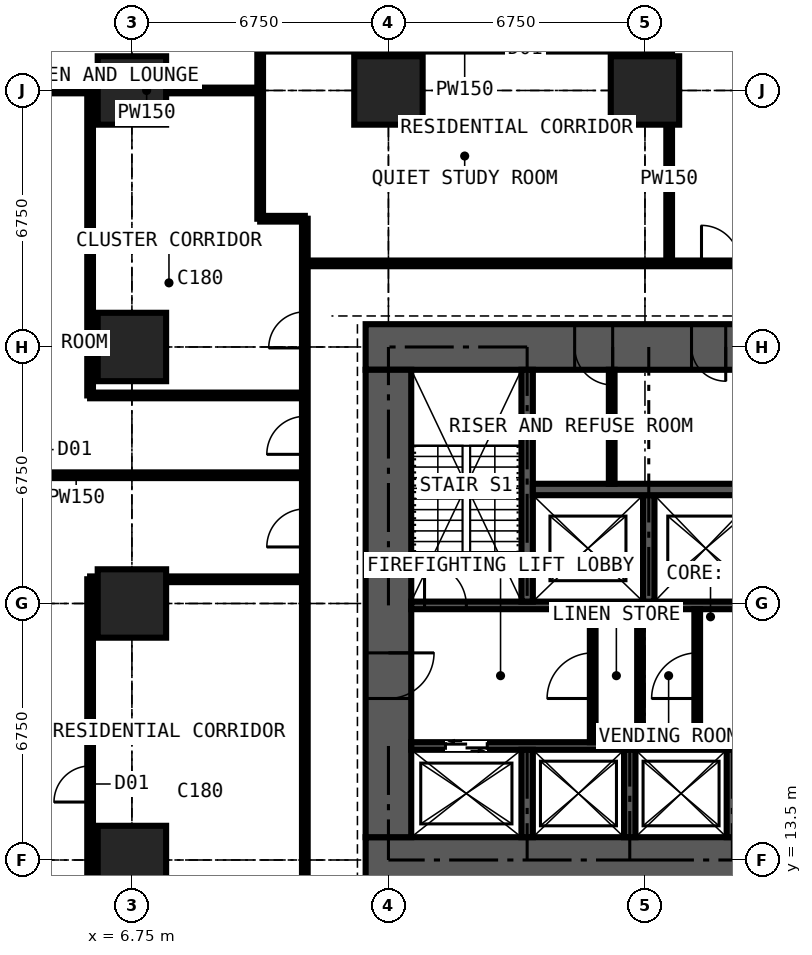
"""IFC4 building model, lengths in metres.
Left out: names, types, materials, properties, quantities, classifications, styles, units other than length and angle.
Written with IfcOpenShell. Run it as: python <this file> out.ifc"""

import sys

from ifc_helpers import new_model, si_unit, direction, frame, frame_2d, origin, origin_2d, place, context, subcontext, project, spatial, rectangle, extrude, element, fill, save


model = new_model("IFC4")
c1 = context("Model", 3, precision=1e-05, world=origin(), true_north=direction((0.0, 1.0)))
c2 = subcontext(c1, "Body", "Model", "MODEL_VIEW")
j1 = project(units=[si_unit("LENGTHUNIT", "METRE"), si_unit("PLANEANGLEUNIT", "RADIAN")], contexts=[c1])
p1 = place(None, origin())
s1 = spatial("IfcSite", under=j1, at=p1, CompositionType="ELEMENT")
p2 = place(p1, origin())
s2 = spatial("IfcBuilding", under=s1, at=p2, CompositionType="ELEMENT")
p3 = place(p2, frame((0.0, 0.0, 57.6)))
s3 = spatial("IfcBuildingStorey", under=s2, at=p3, CompositionType="ELEMENT", Elevation=57.6)
for number, where, z_axis, x_axis in (
    (1, (6.75, 13.5, 0.0), (0.0, 0.0, 1.0), (1.0, 0.0, 0.0)),
    (2, (6.75, 20.25, 0.0), (0.0, 0.0, 1.0), (1.0, 0.0, 0.0)),
    (3, (6.75, 27.0, 0.0), (0.0, 0.0, 1.0), (1.0, 0.0, 0.0)),
    (4, (6.75, 33.75, 0.0), (0.0, 0.0, 1.0), (1.0, 0.0, 0.0)),
    (5, (13.5, 33.75, 0.0), (0.0, 0.0, 1.0), (1.0, 0.0, 0.0)),
    (6, (20.25, 33.75, 0.0), (0.0, 0.0, 1.0), (1.0, 0.0, 0.0)),
):
    element("IfcColumn", number, at=place(p3, frame(where, z_axis=z_axis, x_axis=x_axis)), inside=s3, PredefinedType="COLUMN", context=c2, shape_type="SweptSolid", body=[
        extrude(rectangle(XDim=1.8, YDim=1.8, at=origin_2d()), origin(), (0.0, 0.0, 1.0), 3.6),
    ])
p4 = place(p3, frame((12.9, 13.5, 0.0), z_axis=(0.0, 0.0, 1.0), x_axis=(1.0, 0.0, 0.0)))
e7 = element("IfcWall", 7, at=p4, inside=s3, PredefinedType="SHEAR", context=c2, shape_type="SweptSolid", body=[
    extrude(rectangle(XDim=14.7, YDim=1.2, at=frame_2d((7.35, 0.0))), origin(), (0.0, 0.0, 1.0), 3.6),
])
p5 = place(p3, frame((27.6, 27.0, 0.0), z_axis=(0.0, 0.0, 1.0), x_axis=(-1.0, 0.0, 0.0)))
e8 = element("IfcWall", 8, at=p5, inside=s3, PredefinedType="SHEAR", context=c2, shape_type="SweptSolid", body=[
    extrude(rectangle(XDim=14.7, YDim=1.2, at=frame_2d((7.35, 0.0))), origin(), (0.0, 0.0, 1.0), 3.6),
])
p6 = place(p5, frame((5.225, 0.0, 0.0)))
e9 = element("IfcOpeningElement", 9, at=p6, cuts=e8, PredefinedType="OPENING", context=c2, shape_type="SweptSolid", body=[
    extrude(rectangle(XDim=0.9, YDim=2.2, at=frame_2d((0.45, 1.1))), frame((0.0, 0.61, 0.0), z_axis=(0.0, -1.0, 0.0), x_axis=(1.0, 0.0, 0.0)), (0.0, 0.0, 1.0), 1.22),
])
p7 = place(p5, frame((8.2, 0.0, 0.0)))
e10 = element("IfcOpeningElement", 10, at=p7, cuts=e8, PredefinedType="OPENING", context=c2, shape_type="SweptSolid", body=[
    extrude(rectangle(XDim=1.0, YDim=2.2, at=frame_2d((0.5, 1.1))), frame((0.0, 0.61, 0.0), z_axis=(0.0, -1.0, 0.0), x_axis=(1.0, 0.0, 0.0)), (0.0, 0.0, 1.0), 1.22),
])
p8 = place(p3, frame((13.5, 26.4, 0.0), z_axis=(0.0, 0.0, 1.0), x_axis=(0.0, -1.0, 0.0)))
e11 = element("IfcWall", 11, at=p8, inside=s3, PredefinedType="SHEAR", context=c2, shape_type="SweptSolid", body=[
    extrude(rectangle(XDim=12.3, YDim=1.2, at=frame_2d((6.15, 0.0))), origin(), (0.0, 0.0, 1.0), 3.6),
])
p9 = place(p8, frame((7.45, 0.0, 0.0)))
e12 = element("IfcOpeningElement", 12, at=p9, cuts=e11, PredefinedType="OPENING", context=c2, shape_type="SweptSolid", body=[
    extrude(rectangle(XDim=1.2, YDim=2.2, at=frame_2d((0.6, 1.1))), frame((0.0, 0.61, 0.0), z_axis=(0.0, -1.0, 0.0), x_axis=(1.0, 0.0, 0.0)), (0.0, 0.0, 1.0), 1.22),
])
p10 = place(p3, frame((14.1, 16.5, 0.0), z_axis=(0.0, 0.0, 1.0), x_axis=(1.0, 0.0, 0.0)))
e13 = element("IfcWall", 13, at=p10, inside=s3, PredefinedType="SHEAR", context=c2, shape_type="SweptSolid", body=[
    extrude(rectangle(XDim=12.3, YDim=0.2, at=frame_2d((6.15, 0.0))), origin(), (0.0, 0.0, 1.0), 3.6),
])
p11 = place(p10, frame((0.9, 0.0, 0.0)))
e14 = element("IfcOpeningElement", 14, at=p11, cuts=e13, PredefinedType="OPENING", context=c2, shape_type="SweptSolid", body=[
    extrude(rectangle(XDim=1.1, YDim=2.2, at=frame_2d((0.55, 1.1))), frame((0.0, 0.11, 0.0), z_axis=(0.0, -1.0, 0.0), x_axis=(1.0, 0.0, 0.0)), (0.0, 0.0, 1.0), 0.22),
])
p12 = place(p10, frame((9.5, 0.0, 0.0)))
e15 = element("IfcOpeningElement", 15, at=p12, cuts=e13, PredefinedType="OPENING", context=c2, shape_type="SweptSolid", body=[
    extrude(rectangle(XDim=1.1, YDim=2.2, at=frame_2d((0.55, 1.1))), frame((0.0, 0.11, 0.0), z_axis=(0.0, -1.0, 0.0), x_axis=(1.0, 0.0, 0.0)), (0.0, 0.0, 1.0), 0.22),
])
p13 = place(p3, frame((14.1, 20.2, 0.0), z_axis=(0.0, 0.0, 1.0), x_axis=(1.0, 0.0, 0.0)))
e16 = element("IfcWall", 16, at=p13, inside=s3, PredefinedType="SHEAR", context=c2, shape_type="SweptSolid", body=[
    extrude(rectangle(XDim=12.3, YDim=0.2, at=frame_2d((6.15, 0.0))), origin(), (0.0, 0.0, 1.0), 3.6),
])
p14 = place(p13, frame((0.35, 0.0, 0.0)))
e17 = element("IfcOpeningElement", 17, at=p14, cuts=e16, PredefinedType="OPENING", context=c2, shape_type="SweptSolid", body=[
    extrude(rectangle(XDim=1.1, YDim=2.2, at=frame_2d((0.55, 1.1))), frame((0.0, 0.11, 0.0), z_axis=(0.0, -1.0, 0.0), x_axis=(1.0, 0.0, 0.0)), (0.0, 0.0, 1.0), 0.22),
])
p15 = place(p13, frame((9.75, 0.0, 0.0)))
e18 = element("IfcOpeningElement", 18, at=p15, cuts=e16, PredefinedType="OPENING", context=c2, shape_type="SweptSolid", body=[
    extrude(rectangle(XDim=1.1, YDim=2.2, at=frame_2d((0.55, 1.1))), frame((0.0, 0.11, 0.0), z_axis=(0.0, -1.0, 0.0), x_axis=(1.0, 0.0, 0.0)), (0.0, 0.0, 1.0), 0.22),
])
p16 = place(p3, frame((17.15, 20.3, 0.0), z_axis=(0.0, 0.0, 1.0), x_axis=(0.0, 1.0, 0.0)))
e19 = element("IfcWall", 19, at=p16, inside=s3, PredefinedType="SHEAR", context=c2, shape_type="SweptSolid", body=[
    extrude(rectangle(XDim=6.1, YDim=0.3, at=frame_2d((3.05, 0.0))), origin(), (0.0, 0.0, 1.0), 3.6),
])
p17 = place(p3, frame((20.35, 20.3, 0.0), z_axis=(0.0, 0.0, 1.0), x_axis=(0.0, 1.0, 0.0)))
e20 = element("IfcWall", 20, at=p17, inside=s3, PredefinedType="SHEAR", context=c2, shape_type="SweptSolid", body=[
    extrude(rectangle(XDim=2.8, YDim=0.3, at=frame_2d((1.4, 0.0))), origin(), (0.0, 0.0, 1.0), 3.6),
])
p18 = place(p3, frame((17.3, 23.25, 0.0), z_axis=(0.0, 0.0, 1.0), x_axis=(1.0, 0.0, 0.0)))
e21 = element("IfcWall", 21, at=p18, inside=s3, PredefinedType="SHEAR", context=c2, shape_type="SweptSolid", body=[
    extrude(rectangle(XDim=5.9, YDim=0.3, at=frame_2d((2.95, 0.0))), origin(), (0.0, 0.0, 1.0), 3.6),
])
for number, where, z_axis, x_axis in (
    (22, (17.15, 14.1, 0.0), (0.0, 0.0, 1.0), (0.0, 1.0, 0.0)),
    (23, (19.85, 14.1, 0.0), (0.0, 0.0, 1.0), (0.0, 1.0, 0.0)),
    (24, (22.55, 14.1, 0.0), (0.0, 0.0, 1.0), (0.0, 1.0, 0.0)),
):
    element("IfcWall", number, at=place(p3, frame(where, z_axis=z_axis, x_axis=x_axis)), inside=s3, PredefinedType="SHEAR", context=c2, shape_type="SweptSolid", body=[
        extrude(rectangle(XDim=2.3, YDim=0.3, at=frame_2d((1.15, 0.0))), origin(), (0.0, 0.0, 1.0), 3.6),
    ])
p19 = place(p3, frame((18.875, 16.6, 0.0), z_axis=(0.0, 0.0, 1.0), x_axis=(0.0, 1.0, 0.0)))
e25 = element("IfcWall", 25, at=p19, inside=s3, PredefinedType="PARTITIONING", context=c2, shape_type="SweptSolid", body=[
    extrude(rectangle(XDim=3.5, YDim=0.15, at=frame_2d((1.75, 0.0))), origin(), (0.0, 0.0, 1.0), 3.375),
])
p20 = place(p19, frame((1.15, 0.0, 0.0)))
e26 = element("IfcOpeningElement", 26, at=p20, cuts=e25, PredefinedType="OPENING", context=c2, shape_type="SweptSolid", body=[
    extrude(rectangle(XDim=1.2, YDim=2.2, at=frame_2d((0.6, 1.1))), frame((0.0, 0.085, 0.0), z_axis=(0.0, -1.0, 0.0), x_axis=(1.0, 0.0, 0.0)), (0.0, 0.0, 1.0), 0.17),
])
p21 = place(p3, frame((21.625, 16.6, 0.0), z_axis=(0.0, 0.0, 1.0), x_axis=(0.0, 1.0, 0.0)))
e27 = element("IfcWall", 27, at=p21, inside=s3, PredefinedType="PARTITIONING", context=c2, shape_type="SweptSolid", body=[
    extrude(rectangle(XDim=3.5, YDim=0.15, at=frame_2d((1.75, 0.0))), origin(), (0.0, 0.0, 1.0), 3.375),
])
p22 = place(p21, frame((1.15, 0.0, 0.0)))
e28 = element("IfcOpeningElement", 28, at=p22, cuts=e27, PredefinedType="OPENING", context=c2, shape_type="SweptSolid", body=[
    extrude(rectangle(XDim=1.2, YDim=2.2, at=frame_2d((0.6, 1.1))), frame((0.0, 0.085, 0.0), z_axis=(0.0, -1.0, 0.0), x_axis=(1.0, 0.0, 0.0)), (0.0, 0.0, 1.0), 0.17),
])
p23 = place(p3, frame((20.12, 16.6, 0.0), z_axis=(0.0, 0.0, 1.0), x_axis=(0.0, 1.0, 0.0)))
e29 = element("IfcWall", 29, at=p23, inside=s3, PredefinedType="PARTITIONING", context=c2, shape_type="SweptSolid", body=[
    extrude(rectangle(XDim=3.5, YDim=0.15, at=frame_2d((1.75, 0.0))), origin(), (0.0, 0.0, 1.0), 3.375),
])
p24 = place(p3, frame((19.375, 23.4, 0.0), z_axis=(0.0, 0.0, 1.0), x_axis=(0.0, 1.0, 0.0)))
e30 = element("IfcWall", 30, at=p24, inside=s3, PredefinedType="PARTITIONING", context=c2, shape_type="SweptSolid", body=[
    extrude(rectangle(XDim=3.0, YDim=0.15, at=frame_2d((1.5, 0.0))), origin(), (0.0, 0.0, 1.0), 3.375),
])
p25 = place(p3, frame((-0.734, 23.625, 0.0), z_axis=(0.0, 0.0, 1.0), x_axis=(1.0, 0.0, 0.0)))
e31 = element("IfcWall", 31, at=p25, inside=s3, PredefinedType="PARTITIONING", context=c2, shape_type="SweptSolid", body=[
    extrude(rectangle(XDim=12.034, YDim=0.15, at=frame_2d((6.017, 0.0))), origin(), (0.0, 0.0, 1.0), 3.375),
])
p26 = place(p3, frame((4.15, 33.75, 0.0), z_axis=(0.0, 0.0, 1.0), x_axis=(1.0, 0.0, 0.0)))
e32 = element("IfcWall", 32, at=p26, inside=s3, PredefinedType="PARTITIONING", context=c2, shape_type="SweptSolid", body=[
    extrude(rectangle(XDim=5.975, YDim=0.15, at=frame_2d((2.988, 0.0))), origin(), (0.0, 0.0, 1.0), 2.877),
])
p27 = place(p3, frame((5.65, 10.125, 0.0), z_axis=(0.0, 0.0, 1.0), x_axis=(0.0, 1.0, 0.0)))
e33 = element("IfcWall", 33, at=p27, inside=s3, PredefinedType="PARTITIONING", context=c2, shape_type="SweptSolid", body=[
    extrude(rectangle(XDim=10.762, YDim=0.15, at=frame_2d((5.381, 0.0))), origin(), (0.0, 0.0, 1.0), 3.375),
])
p28 = place(p27, frame((4.9, 0.0, 0.0)))
e34 = element("IfcOpeningElement", 34, at=p28, cuts=e33, PredefinedType="OPENING", context=c2, shape_type="SweptSolid", body=[
    extrude(rectangle(XDim=0.95, YDim=2.2, at=frame_2d((0.475, 1.1))), frame((0.0, 0.085, 0.0), z_axis=(0.0, -1.0, 0.0), x_axis=(1.0, 0.0, 0.0)), (0.0, 0.0, 1.0), 0.17),
])
p29 = place(p3, frame((5.65, 20.887, 0.0), z_axis=(0.0, 0.0, 1.0), x_axis=(1.0, 0.0, 0.0)))
e35 = element("IfcWall", 35, at=p29, inside=s3, PredefinedType="PARTITIONING", context=c2, shape_type="SweptSolid", body=[
    extrude(rectangle(XDim=5.65, YDim=0.15, at=frame_2d((2.825, 0.0))), origin(), (0.0, 0.0, 1.0), 3.375),
])
p30 = place(p3, frame((5.65, 25.725, 0.0), z_axis=(0.0, 0.0, 1.0), x_axis=(0.0, 1.0, 0.0)))
e36 = element("IfcWall", 36, at=p30, inside=s3, PredefinedType="PARTITIONING", context=c2, shape_type="SweptSolid", body=[
    extrude(rectangle(XDim=8.025, YDim=0.15, at=frame_2d((4.012, 0.0))), origin(), (0.0, 0.0, 1.0), 3.375),
])
p31 = place(p3, frame((5.65, 25.725, 0.0), z_axis=(0.0, 0.0, 1.0), x_axis=(1.0, 0.0, 0.0)))
e37 = element("IfcWall", 37, at=p31, inside=s3, PredefinedType="PARTITIONING", context=c2, shape_type="SweptSolid", body=[
    extrude(rectangle(XDim=5.65, YDim=0.15, at=frame_2d((2.825, 0.0))), origin(), (0.0, 0.0, 1.0), 3.375),
])
p32 = place(p3, frame((10.125, 30.375, 0.0), z_axis=(0.0, 0.0, 1.0), x_axis=(0.0, 1.0, 0.0)))
e38 = element("IfcWall", 38, at=p32, inside=s3, PredefinedType="PARTITIONING", context=c2, shape_type="SweptSolid", body=[
    extrude(rectangle(XDim=10.859, YDim=0.15, at=frame_2d((5.429, 0.0))), origin(), (0.0, 0.0, 1.0), 3.375),
])
p33 = place(p3, frame((10.125, 30.375, 0.0), z_axis=(0.0, 0.0, 1.0), x_axis=(1.0, 0.0, 0.0)))
e39 = element("IfcWall", 39, at=p33, inside=s3, PredefinedType="PARTITIONING", context=c2, shape_type="SweptSolid", body=[
    extrude(rectangle(XDim=1.175, YDim=0.15, at=frame_2d((0.587, 0.0))), origin(), (0.0, 0.0, 1.0), 3.375),
])
p34 = place(p3, frame((11.3, 11.3, 0.0), z_axis=(0.0, 0.0, 1.0), x_axis=(0.0, 1.0, 0.0)))
e40 = element("IfcWall", 40, at=p34, inside=s3, PredefinedType="PARTITIONING", context=c2, shape_type="SweptSolid", body=[
    extrude(rectangle(XDim=19.075, YDim=0.15, at=frame_2d((9.538, 0.0))), origin(), (0.0, 0.0, 1.0), 3.375),
])
p35 = place(p34, frame((12.875, 0.0, 0.0)))
e41 = element("IfcOpeningElement", 41, at=p35, cuts=e40, PredefinedType="OPENING", context=c2, shape_type="SweptSolid", body=[
    extrude(rectangle(XDim=1.0, YDim=2.2, at=frame_2d((0.5, 1.1))), frame((0.0, 0.085, 0.0), z_axis=(0.0, -1.0, 0.0), x_axis=(1.0, 0.0, 0.0)), (0.0, 0.0, 1.0), 0.17),
])
p36 = place(p34, frame((10.438, 0.0, 0.0)))
e42 = element("IfcOpeningElement", 42, at=p36, cuts=e40, PredefinedType="OPENING", context=c2, shape_type="SweptSolid", body=[
    extrude(rectangle(XDim=1.0, YDim=2.2, at=frame_2d((0.5, 1.1))), frame((0.0, 0.085, 0.0), z_axis=(0.0, -1.0, 0.0), x_axis=(1.0, 0.0, 0.0)), (0.0, 0.0, 1.0), 0.17),
])
p37 = place(p34, frame((15.675, 0.0, 0.0)))
e43 = element("IfcOpeningElement", 43, at=p37, cuts=e40, PredefinedType="OPENING", context=c2, shape_type="SweptSolid", body=[
    extrude(rectangle(XDim=0.95, YDim=2.2, at=frame_2d((0.475, 1.1))), frame((0.0, 0.085, 0.0), z_axis=(0.0, -1.0, 0.0), x_axis=(1.0, 0.0, 0.0)), (0.0, 0.0, 1.0), 0.17),
])
p38 = place(p3, frame((11.3, 29.2, 0.0), z_axis=(0.0, 0.0, 1.0), x_axis=(1.0, 0.0, 0.0)))
e44 = element("IfcWall", 44, at=p38, inside=s3, PredefinedType="PARTITIONING", context=c2, shape_type="SweptSolid", body=[
    extrude(rectangle(XDim=19.075, YDim=0.15, at=frame_2d((9.538, 0.0))), origin(), (0.0, 0.0, 1.0), 3.375),
])
p39 = place(p38, frame((12.875, 0.0, 0.0)))
e45 = element("IfcOpeningElement", 45, at=p39, cuts=e44, PredefinedType="OPENING", context=c2, shape_type="SweptSolid", body=[
    extrude(rectangle(XDim=1.0, YDim=2.2, at=frame_2d((0.5, 1.1))), frame((0.0, 0.085, 0.0), z_axis=(0.0, -1.0, 0.0), x_axis=(1.0, 0.0, 0.0)), (0.0, 0.0, 1.0), 0.17),
])
p40 = place(p38, frame((10.438, 0.0, 0.0)))
e46 = element("IfcOpeningElement", 46, at=p40, cuts=e44, PredefinedType="OPENING", context=c2, shape_type="SweptSolid", body=[
    extrude(rectangle(XDim=1.0, YDim=2.2, at=frame_2d((0.5, 1.1))), frame((0.0, 0.085, 0.0), z_axis=(0.0, -1.0, 0.0), x_axis=(1.0, 0.0, 0.0)), (0.0, 0.0, 1.0), 0.17),
])
p41 = place(p38, frame((15.675, 0.0, 0.0)))
e47 = element("IfcOpeningElement", 47, at=p41, cuts=e44, PredefinedType="OPENING", context=c2, shape_type="SweptSolid", body=[
    extrude(rectangle(XDim=0.95, YDim=2.2, at=frame_2d((0.475, 1.1))), frame((0.0, 0.085, 0.0), z_axis=(0.0, -1.0, 0.0), x_axis=(1.0, 0.0, 0.0)), (0.0, 0.0, 1.0), 0.17),
])
p42 = place(p3, frame((20.887, 29.2, 0.0), z_axis=(0.0, 0.0, 1.0), x_axis=(0.0, 1.0, 0.0)))
e48 = element("IfcWall", 48, at=p42, inside=s3, PredefinedType="PARTITIONING", context=c2, shape_type="SweptSolid", body=[
    extrude(rectangle(XDim=5.65, YDim=0.15, at=frame_2d((2.825, 0.0))), origin(), (0.0, 0.0, 1.0), 3.375),
])
p43 = place(p11, origin())
e49 = element("IfcDoor", 49, at=p43, inside=s3, OperationType="DOUBLE_DOOR_SLIDING", PredefinedType="DOOR", context=c2, shape_type="SweptSolid", body=[
    extrude(rectangle(XDim=1.1, YDim=2.2, at=frame_2d((0.55, 1.1))), frame((0.0, 0.025, 0.0), z_axis=(0.0, -1.0, 0.0), x_axis=(1.0, 0.0, 0.0)), (0.0, 0.0, 1.0), 0.05),
])
fill(e14, e49)
p44 = place(p9, origin())
e50 = element("IfcDoor", 50, at=p44, inside=s3, OperationType="DOUBLE_DOOR_SINGLE_SWING", PredefinedType="DOOR", context=c2, shape_type="SweptSolid", body=[
    extrude(rectangle(XDim=1.2, YDim=2.2, at=frame_2d((0.6, 1.1))), frame((0.0, 0.025, 0.0), z_axis=(0.0, -1.0, 0.0), x_axis=(1.0, 0.0, 0.0)), (0.0, 0.0, 1.0), 0.05),
])
fill(e12, e50)
p45 = place(p20, origin())
e51 = element("IfcDoor", 51, at=p45, inside=s3, OperationType="DOUBLE_DOOR_SINGLE_SWING", PredefinedType="DOOR", context=c2, shape_type="SweptSolid", body=[
    extrude(rectangle(XDim=1.2, YDim=2.2, at=frame_2d((0.6, 1.1))), frame((0.0, 0.025, 0.0), z_axis=(0.0, -1.0, 0.0), x_axis=(1.0, 0.0, 0.0)), (0.0, 0.0, 1.0), 0.05),
])
fill(e26, e51)
p46 = place(p22, origin())
e52 = element("IfcDoor", 52, at=p46, inside=s3, OperationType="DOUBLE_DOOR_SINGLE_SWING", PredefinedType="DOOR", context=c2, shape_type="SweptSolid", body=[
    extrude(rectangle(XDim=1.2, YDim=2.2, at=frame_2d((0.6, 1.1))), frame((0.0, 0.025, 0.0), z_axis=(0.0, -1.0, 0.0), x_axis=(1.0, 0.0, 0.0)), (0.0, 0.0, 1.0), 0.05),
])
fill(e28, e52)
p47 = place(p6, origin())
e53 = element("IfcDoor", 53, at=p47, inside=s3, OperationType="SINGLE_SWING_LEFT", PredefinedType="DOOR", context=c2, shape_type="SweptSolid", body=[
    extrude(rectangle(XDim=0.9, YDim=2.2, at=frame_2d((0.45, 1.1))), frame((0.0, 0.4, 0.0), z_axis=(0.0, -1.0, 0.0), x_axis=(1.0, 0.0, 0.0)), (0.0, 0.0, 1.0), 0.8),
])
fill(e9, e53)
p48 = place(p7, origin())
e54 = element("IfcDoor", 54, at=p48, inside=s3, OperationType="SINGLE_SWING_LEFT", PredefinedType="DOOR", context=c2, shape_type="SweptSolid", body=[
    extrude(rectangle(XDim=1.0, YDim=2.2, at=frame_2d((0.5, 1.1))), frame((0.0, 0.025, 0.0), z_axis=(0.0, -1.0, 0.0), x_axis=(1.0, 0.0, 0.0)), (0.0, 0.0, 1.0), 0.05),
])
fill(e10, e54)
p49 = place(p14, origin())
e55 = element("IfcDoor", 55, at=p49, inside=s3, OperationType="SINGLE_SWING_LEFT", PredefinedType="DOOR", context=c2, shape_type="SweptSolid", body=[
    extrude(rectangle(XDim=1.1, YDim=2.2, at=frame_2d((0.55, 1.1))), frame((0.0, 0.025, 0.0), z_axis=(0.0, -1.0, 0.0), x_axis=(1.0, 0.0, 0.0)), (0.0, 0.0, 1.0), 0.05),
])
fill(e17, e55)
p50 = place(p40, origin())
e56 = element("IfcDoor", 56, at=p50, inside=s3, OperationType="SINGLE_SWING_LEFT", PredefinedType="DOOR", context=c2, shape_type="SweptSolid", body=[
    extrude(rectangle(XDim=1.0, YDim=2.2, at=frame_2d((0.5, 1.1))), frame((0.0, 0.025, 0.0), z_axis=(0.0, -1.0, 0.0), x_axis=(1.0, 0.0, 0.0)), (0.0, 0.0, 1.0), 0.05),
])
fill(e46, e56)
p51 = place(p35, origin())
e57 = element("IfcDoor", 57, at=p51, inside=s3, OperationType="SINGLE_SWING_LEFT", PredefinedType="DOOR", context=c2, shape_type="SweptSolid", body=[
    extrude(rectangle(XDim=1.0, YDim=2.2, at=frame_2d((0.5, 1.1))), frame((0.0, 0.025, 0.0), z_axis=(0.0, -1.0, 0.0), x_axis=(1.0, 0.0, 0.0)), (0.0, 0.0, 1.0), 0.05),
])
fill(e41, e57)
p52 = place(p36, origin())
e58 = element("IfcDoor", 58, at=p52, inside=s3, OperationType="SINGLE_SWING_LEFT", PredefinedType="DOOR", context=c2, shape_type="SweptSolid", body=[
    extrude(rectangle(XDim=1.0, YDim=2.2, at=frame_2d((0.5, 1.1))), frame((0.0, 0.025, 0.0), z_axis=(0.0, -1.0, 0.0), x_axis=(1.0, 0.0, 0.0)), (0.0, 0.0, 1.0), 0.05),
])
fill(e42, e58)
p53 = place(p37, origin())
e59 = element("IfcDoor", 59, at=p53, inside=s3, OperationType="SINGLE_SWING_LEFT", PredefinedType="DOOR", context=c2, shape_type="SweptSolid", body=[
    extrude(rectangle(XDim=0.95, YDim=2.2, at=frame_2d((0.475, 1.1))), frame((0.0, 0.025, 0.0), z_axis=(0.0, -1.0, 0.0), x_axis=(1.0, 0.0, 0.0)), (0.0, 0.0, 1.0), 0.05),
])
fill(e43, e59)
p54 = place(p28, origin())
e60 = element("IfcDoor", 60, at=p54, inside=s3, OperationType="SINGLE_SWING_LEFT", PredefinedType="DOOR", context=c2, shape_type="SweptSolid", body=[
    extrude(rectangle(XDim=0.95, YDim=2.2, at=frame_2d((0.475, 1.1))), frame((0.0, 0.025, 0.0), z_axis=(0.0, -1.0, 0.0), x_axis=(1.0, 0.0, 0.0)), (0.0, 0.0, 1.0), 0.05),
])
fill(e34, e60)
save(model, sys.argv[1])
